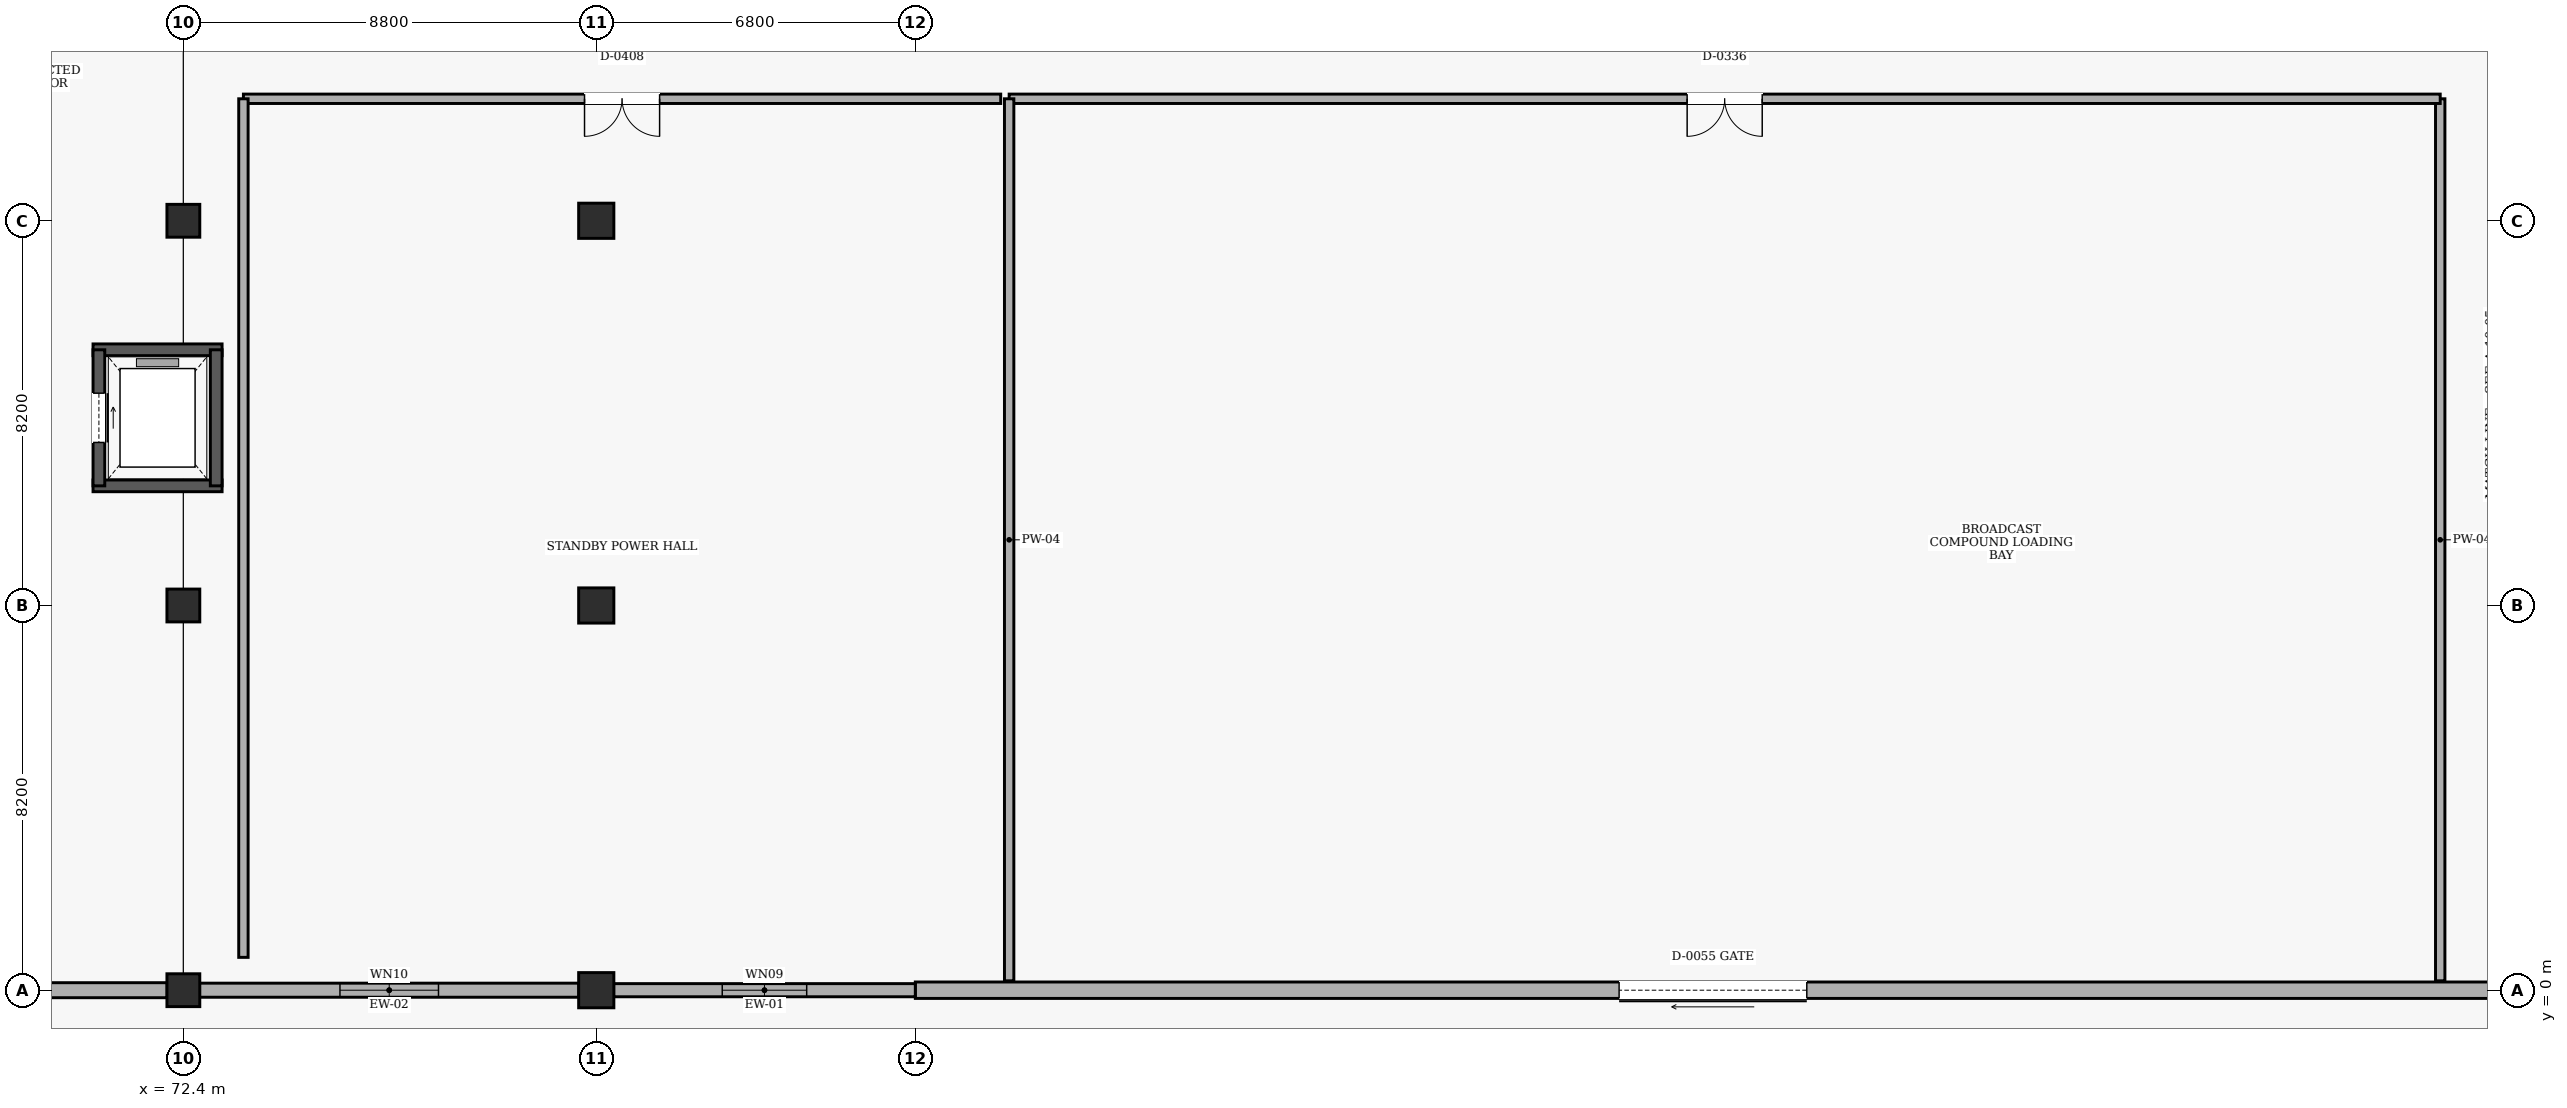
"""IFC4 building model, lengths in metres.
Left out: names, types, materials, properties, quantities, classifications, styles, units other than length and angle.
Written with IfcOpenShell. Run it as: python <this file> out.ifc"""

import sys

from ifc_helpers import new_model, si_unit, direction, frame, frame_2d, origin, origin_2d, place, context, subcontext, project, spatial, rectangle, extrude, element, fill, save


model = new_model("IFC4")
c1 = context("Model", 3, precision=1e-05, world=origin(), true_north=direction((0.0, 1.0)))
c2 = subcontext(c1, "Body", "Model", "MODEL_VIEW")
j1 = project(units=[si_unit("LENGTHUNIT", "METRE"), si_unit("PLANEANGLEUNIT", "RADIAN")], contexts=[c1])
p1 = place(None, origin())
s1 = spatial("IfcSite", under=j1, at=p1, CompositionType="ELEMENT")
p2 = place(p1, origin())
s2 = spatial("IfcBuilding", under=s1, at=p2, CompositionType="ELEMENT")
p3 = place(p2, origin())
s3 = spatial("IfcBuildingStorey", under=s2, at=p3, CompositionType="ELEMENT", Elevation=0.0)
for number, where, z_axis, x_axis in (
    (1, (72.4, 0.0, 0.0), (0.0, 0.0, 1.0), (1.0, 0.0, 0.0)),
    (2, (72.4, 8.2, 0.0), (0.0, 0.0, 1.0), (1.0, 0.0, 0.0)),
    (3, (72.4, 16.4, 0.0), (0.0, 0.0, 1.0), (1.0, 0.0, 0.0)),
):
    element("IfcColumn", number, at=place(p3, frame(where, z_axis=z_axis, x_axis=x_axis)), inside=s3, PredefinedType="COLUMN", context=c2, shape_type="SweptSolid", body=[
        extrude(rectangle(XDim=0.7, YDim=0.7, at=origin_2d()), origin(), (0.0, 0.0, 1.0), 5.4),
    ])
for number, where, z_axis, x_axis in (
    (4, (81.2, 0.0, 0.0), (0.0, 0.0, 1.0), (1.0, 0.0, 0.0)),
    (5, (81.2, 8.2, 0.0), (0.0, 0.0, 1.0), (1.0, 0.0, 0.0)),
    (6, (81.2, 16.4, 0.0), (0.0, 0.0, 1.0), (1.0, 0.0, 0.0)),
):
    element("IfcColumn", number, at=place(p3, frame(where, z_axis=z_axis, x_axis=x_axis)), inside=s3, PredefinedType="COLUMN", context=c2, shape_type="SweptSolid", body=[
        extrude(rectangle(XDim=0.75, YDim=0.75, at=origin_2d()), origin(), (0.0, 0.0, 1.0), 5.4),
    ])
p4 = place(p3, frame((122.0, 0.0, 0.0), z_axis=(0.0, 0.0, 1.0), x_axis=(-1.0, 0.0, 0.0)))
e7 = element("IfcWall", 7, at=p4, inside=s3, PredefinedType="SOLIDWALL", context=c2, shape_type="SweptSolid", body=[
    extrude(rectangle(XDim=34.0, YDim=0.35, at=frame_2d((17.0, 0.0))), origin(), (0.0, 0.0, 1.0), 5.08),
])
p5 = place(p4, frame((15.0, 0.0, 0.0)))
e8 = element("IfcOpeningElement", 8, at=p5, cuts=e7, PredefinedType="OPENING", context=c2, shape_type="SweptSolid", body=[
    extrude(rectangle(XDim=4.0, YDim=3.5, at=frame_2d((2.0, 1.75))), frame((0.0, 0.185, 0.0), z_axis=(0.0, -1.0, 0.0), x_axis=(1.0, 0.0, 0.0)), (0.0, 0.0, 1.0), 0.37),
])
p6 = place(p3, frame((88.0, 0.0, 0.0), z_axis=(0.0, 0.0, 1.0), x_axis=(-1.0, 0.0, 0.0)))
e9 = element("IfcWall", 9, at=p6, inside=s3, PredefinedType="SOLIDWALL", context=c2, shape_type="SweptSolid", body=[
    extrude(rectangle(XDim=6.43, YDim=0.28, at=frame_2d((3.215, 0.0))), origin(), (0.0, 0.0, 1.0), 5.08),
])
p7 = place(p6, frame((2.315, 0.0, 0.9)))
e10 = element("IfcOpeningElement", 10, at=p7, cuts=e9, PredefinedType="OPENING", context=c2, shape_type="SweptSolid", body=[
    extrude(rectangle(XDim=1.8, YDim=1.8, at=frame_2d((0.9, 0.9))), frame((0.0, 0.15, 0.0), z_axis=(0.0, -1.0, 0.0), x_axis=(1.0, 0.0, 0.0)), (0.0, 0.0, 1.0), 0.3),
])
p8 = place(p3, frame((80.83, 0.0, 0.0), z_axis=(0.0, 0.0, 1.0), x_axis=(-1.0, 0.0, 0.0)))
e11 = element("IfcWall", 11, at=p8, inside=s3, PredefinedType="SOLIDWALL", context=c2, shape_type="SweptSolid", body=[
    extrude(rectangle(XDim=8.085, YDim=0.3, at=frame_2d((4.042, 0.0))), origin(), (0.0, 0.0, 1.0), 4.26),
])
p9 = place(p8, frame((2.992, 0.0, 0.9)))
e12 = element("IfcOpeningElement", 12, at=p9, cuts=e11, PredefinedType="OPENING", context=c2, shape_type="SweptSolid", body=[
    extrude(rectangle(XDim=2.1, YDim=1.8, at=frame_2d((1.05, 0.9))), frame((0.0, 0.16, 0.0), z_axis=(0.0, -1.0, 0.0), x_axis=(1.0, 0.0, 0.0)), (0.0, 0.0, 1.0), 0.32),
])
p10 = place(p3, frame((72.055, 0.0, 0.0), z_axis=(0.0, 0.0, 1.0), x_axis=(-1.0, 0.0, 0.0)))
e13 = element("IfcWall", 13, at=p10, inside=s3, PredefinedType="SOLIDWALL", context=c2, shape_type="SweptSolid", body=[
    extrude(rectangle(XDim=8.235, YDim=0.32, at=frame_2d((4.117, 0.0))), origin(), (0.0, 0.0, 1.0), 4.36),
])
p11 = place(p10, frame((2.917, 0.0, 0.9)))
e14 = element("IfcOpeningElement", 14, at=p11, cuts=e13, PredefinedType="OPENING", context=c2, shape_type="SweptSolid", body=[
    extrude(rectangle(XDim=2.4, YDim=1.8, at=frame_2d((1.2, 0.9))), frame((0.0, 0.17, 0.0), z_axis=(0.0, -1.0, 0.0), x_axis=(1.0, 0.0, 0.0)), (0.0, 0.0, 1.0), 0.34),
])
for number, where, z_axis, x_axis in (
    (15, (70.475, 10.75, 0.0), (0.0, 0.0, 1.0), (1.0, 0.0, 0.0)),
    (16, (73.225, 13.65, 0.0), (0.0, 0.0, 1.0), (-1.0, 0.0, 0.0)),
):
    element("IfcWall", number, at=place(p3, frame(where, z_axis=z_axis, x_axis=x_axis)), inside=s3, PredefinedType="SHEAR", context=c2, shape_type="SweptSolid", body=[
        extrude(rectangle(XDim=2.75, YDim=0.25, at=frame_2d((1.375, 0.0))), origin(), (0.0, 0.0, 1.0), 5.08),
    ])
p12 = place(p3, frame((70.6, 13.65, 0.0), z_axis=(0.0, 0.0, 1.0), x_axis=(0.0, -1.0, 0.0)))
e17 = element("IfcWall", 17, at=p12, inside=s3, PredefinedType="SHEAR", context=c2, shape_type="SweptSolid", body=[
    extrude(rectangle(XDim=2.9, YDim=0.25, at=frame_2d((1.45, 0.0))), origin(), (0.0, 0.0, 1.0), 5.08),
])
p13 = place(p12, frame((0.925, 0.0, 0.0)))
e18 = element("IfcOpeningElement", 18, at=p13, cuts=e17, PredefinedType="OPENING", context=c2, shape_type="SweptSolid", body=[
    extrude(rectangle(XDim=1.05, YDim=2.15, at=frame_2d((0.525, 1.075))), frame((0.0, 0.135, 0.0), z_axis=(0.0, -1.0, 0.0), x_axis=(1.0, 0.0, 0.0)), (0.0, 0.0, 1.0), 0.27),
])
p14 = place(p3, frame((73.1, 10.75, 0.0), z_axis=(0.0, 0.0, 1.0), x_axis=(0.0, 1.0, 0.0)))
e19 = element("IfcWall", 19, at=p14, inside=s3, PredefinedType="SHEAR", context=c2, shape_type="SweptSolid", body=[
    extrude(rectangle(XDim=2.9, YDim=0.25, at=frame_2d((1.45, 0.0))), origin(), (0.0, 0.0, 1.0), 5.08),
])
p15 = place(p3, frame((120.5, 0.2, 0.0), z_axis=(0.0, 0.0, 1.0), x_axis=(0.0, 1.0, 0.0)))
e20 = element("IfcWall", 20, at=p15, inside=s3, PredefinedType="PARTITIONING", context=c2, shape_type="SweptSolid", body=[
    extrude(rectangle(XDim=18.8, YDim=0.2, at=frame_2d((9.4, 0.0))), origin(), (0.0, 0.0, 1.0), 5.08),
])
p16 = place(p3, frame((120.5, 19.0, 0.0), z_axis=(0.0, 0.0, 1.0), x_axis=(-1.0, 0.0, 0.0)))
e21 = element("IfcWall", 21, at=p16, inside=s3, PredefinedType="PARTITIONING", context=c2, shape_type="SweptSolid", body=[
    extrude(rectangle(XDim=30.5, YDim=0.2, at=frame_2d((15.25, 0.0))), origin(), (0.0, 0.0, 1.0), 5.08),
])
p17 = place(p16, frame((14.45, 0.0, 0.0)))
e22 = element("IfcOpeningElement", 22, at=p17, cuts=e21, PredefinedType="OPENING", context=c2, shape_type="SweptSolid", body=[
    extrude(rectangle(XDim=1.6, YDim=2.2, at=frame_2d((0.8, 1.1))), frame((0.0, 0.11, 0.0), z_axis=(0.0, -1.0, 0.0), x_axis=(1.0, 0.0, 0.0)), (0.0, 0.0, 1.0), 0.22),
])
p18 = place(p3, frame((90.0, 19.0, 0.0), z_axis=(0.0, 0.0, 1.0), x_axis=(0.0, -1.0, 0.0)))
e23 = element("IfcWall", 23, at=p18, inside=s3, PredefinedType="PARTITIONING", context=c2, shape_type="SweptSolid", body=[
    extrude(rectangle(XDim=18.8, YDim=0.2, at=frame_2d((9.4, 0.0))), origin(), (0.0, 0.0, 1.0), 5.08),
])
p19 = place(p3, frame((89.82, 19.0, 0.0), z_axis=(0.0, 0.0, 1.0), x_axis=(-1.0, 0.0, 0.0)))
e24 = element("IfcWall", 24, at=p19, inside=s3, PredefinedType="PARTITIONING", context=c2, shape_type="SweptSolid", body=[
    extrude(rectangle(XDim=16.14, YDim=0.2, at=frame_2d((8.07, 0.0))), origin(), (0.0, 0.0, 1.0), 5.08),
])
p20 = place(p19, frame((7.27, 0.0, 0.0)))
e25 = element("IfcOpeningElement", 25, at=p20, cuts=e24, PredefinedType="OPENING", context=c2, shape_type="SweptSolid", body=[
    extrude(rectangle(XDim=1.6, YDim=2.2, at=frame_2d((0.8, 1.1))), frame((0.0, 0.11, 0.0), z_axis=(0.0, -1.0, 0.0), x_axis=(1.0, 0.0, 0.0)), (0.0, 0.0, 1.0), 0.22),
])
p21 = place(p3, frame((73.68, 19.0, 0.0), z_axis=(0.0, 0.0, 1.0), x_axis=(0.0, -1.0, 0.0)))
e26 = element("IfcWall", 26, at=p21, inside=s3, PredefinedType="PARTITIONING", context=c2, shape_type="SweptSolid", body=[
    extrude(rectangle(XDim=18.3, YDim=0.2, at=frame_2d((9.15, 0.0))), origin(), (0.0, 0.0, 1.0), 5.08),
])
p22 = place(p5, origin())
e27 = element("IfcDoor", 27, at=p22, inside=s3, OperationType="ROLLINGUP", PredefinedType="DOOR", context=c2, shape_type="SweptSolid", body=[
    extrude(rectangle(XDim=4.0, YDim=3.5, at=frame_2d((2.0, 1.75))), frame((0.0, 0.025, 0.0), z_axis=(0.0, -1.0, 0.0), x_axis=(1.0, 0.0, 0.0)), (0.0, 0.0, 1.0), 0.05),
])
fill(e8, e27)
p23 = place(p7, origin())
e28 = element("IfcWindow", 28, at=p23, inside=s3, PartitioningType="SINGLE_PANEL", PredefinedType="WINDOW", context=c2, shape_type="SweptSolid", body=[
    extrude(rectangle(XDim=1.8, YDim=1.8, at=frame_2d((0.9, 0.9))), frame((0.0, 0.03, 0.0), z_axis=(0.0, -1.0, 0.0), x_axis=(1.0, 0.0, 0.0)), (0.0, 0.0, 1.0), 0.06),
])
fill(e10, e28)
p24 = place(p9, origin())
e29 = element("IfcWindow", 29, at=p24, inside=s3, PartitioningType="SINGLE_PANEL", PredefinedType="WINDOW", context=c2, shape_type="SweptSolid", body=[
    extrude(rectangle(XDim=2.1, YDim=1.8, at=frame_2d((1.05, 0.9))), frame((0.0, 0.03, 0.0), z_axis=(0.0, -1.0, 0.0), x_axis=(1.0, 0.0, 0.0)), (0.0, 0.0, 1.0), 0.06),
])
fill(e12, e29)
p25 = place(p13, origin())
e30 = element("IfcDoor", 30, at=p25, inside=s3, OperationType="SLIDING_TO_RIGHT", PredefinedType="DOOR", context=c2, shape_type="SweptSolid", body=[
    extrude(rectangle(XDim=1.05, YDim=2.15, at=frame_2d((0.525, 1.075))), frame((0.0, 0.025, 0.0), z_axis=(0.0, -1.0, 0.0), x_axis=(1.0, 0.0, 0.0)), (0.0, 0.0, 1.0), 0.05),
])
fill(e18, e30)
p26 = place(p17, origin())
e31 = element("IfcDoor", 31, at=p26, inside=s3, OperationType="DOUBLE_DOOR_SINGLE_SWING", PredefinedType="DOOR", context=c2, shape_type="SweptSolid", body=[
    extrude(rectangle(XDim=1.6, YDim=2.2, at=frame_2d((0.8, 1.1))), frame((0.0, 0.025, 0.0), z_axis=(0.0, -1.0, 0.0), x_axis=(1.0, 0.0, 0.0)), (0.0, 0.0, 1.0), 0.05),
])
fill(e22, e31)
p27 = place(p20, origin())
e32 = element("IfcDoor", 32, at=p27, inside=s3, OperationType="DOUBLE_DOOR_SINGLE_SWING", PredefinedType="DOOR", context=c2, shape_type="SweptSolid", body=[
    extrude(rectangle(XDim=1.6, YDim=2.2, at=frame_2d((0.8, 1.1))), frame((0.0, 0.025, 0.0), z_axis=(0.0, -1.0, 0.0), x_axis=(1.0, 0.0, 0.0)), (0.0, 0.0, 1.0), 0.05),
])
fill(e25, e32)
save(model, sys.argv[1])
